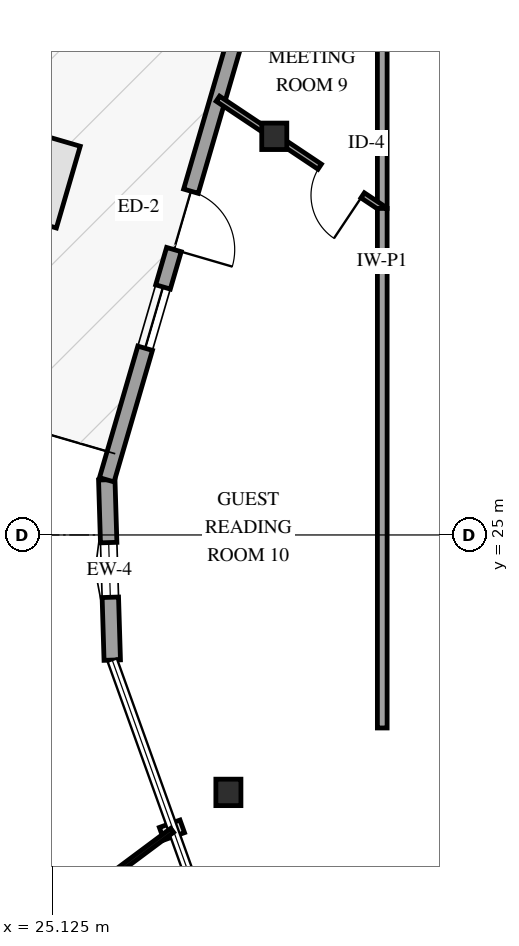
"""IFC4 building model, lengths in metres.
Left out: names, types, materials, properties, quantities, classifications, styles, units other than length and angle.
Written with IfcOpenShell. Run it as: python <this file> out.ifc"""

import sys

from ifc_helpers import new_model, si_unit, direction, frame, frame_2d, origin, origin_2d, place, context, subcontext, project, spatial, rectangle, i_section, extrude, element, fill, save


model = new_model("IFC4")
c1 = context("Model", 3, precision=1e-05, world=origin(), true_north=direction((0.0, 1.0)))
c2 = subcontext(c1, "Body", "Model", "MODEL_VIEW")
j1 = project(units=[si_unit("LENGTHUNIT", "METRE"), si_unit("PLANEANGLEUNIT", "RADIAN")], contexts=[c1])
p1 = place(None, origin())
s1 = spatial("IfcSite", under=j1, at=p1, CompositionType="ELEMENT")
p2 = place(p1, origin())
s2 = spatial("IfcBuilding", under=s1, at=p2, CompositionType="ELEMENT")
p3 = place(p2, frame((0.0, 0.0, 171.4)))
s3 = spatial("IfcBuildingStorey", under=s2, at=p3, CompositionType="ELEMENT", Elevation=171.4)
for number, where, z_axis, x_axis in (
    (1, (28.774, 31.556, 0.0), (0.0, 0.0, 1.0), (1.0, 0.0, 0.0)),
    (2, (28.02, 20.766, 0.0), (0.0, 0.0, 1.0), (1.0, 0.0, 0.0)),
):
    element("IfcColumn", number, at=place(p3, frame(where, z_axis=z_axis, x_axis=x_axis)), inside=s3, PredefinedType="COLUMN", context=c2, shape_type="SweptSolid", body=[
        extrude(i_section(OverallWidth=0.412, OverallDepth=0.435, WebThickness=0.036, FlangeThickness=0.057, FilletRadius=0.038, at=origin_2d()), origin(), (0.0, 0.0, 1.0), 3.6),
    ])
p4 = place(p3, frame((26.02, 25.907, 0.0), z_axis=(0.0, 0.0, 1.0), x_axis=(0.030366361796, -0.999538835699, 0.0)))
e3 = element("IfcWall", 3, at=p4, inside=s3, PredefinedType="SOLIDWALL", context=c2, shape_type="SweptSolid", body=[
    extrude(rectangle(XDim=2.967, YDim=0.27, at=frame_2d((1.483, 0.0))), origin(), (0.0, 0.0, 1.0), 2.679),
])
p5 = place(p4, frame((1.033, 0.0, 0.75)))
e4 = element("IfcOpeningElement", 4, at=p5, cuts=e3, PredefinedType="OPENING", context=c2, shape_type="SweptSolid", body=[
    extrude(rectangle(XDim=0.9, YDim=1.5, at=frame_2d((0.45, 0.75))), frame((0.0, 0.145, 0.0), z_axis=(0.0, -1.0, 0.0), x_axis=(1.0, 0.0, 0.0)), (0.0, 0.0, 1.0), 0.29),
])
p6 = place(p3, frame((28.508, 34.439, 0.0), z_axis=(0.0, 0.0, 1.0), x_axis=(-0.28, -0.96, 0.0)))
e5 = element("IfcWall", 5, at=p6, inside=s3, PredefinedType="SOLIDWALL", context=c2, shape_type="SweptSolid", body=[
    extrude(rectangle(XDim=8.887, YDim=0.25, at=frame_2d((4.443, 0.0))), origin(), (0.0, 0.0, 1.0), 2.679),
])
p7 = place(p6, frame((3.943, 0.0, 0.0)))
e6 = element("IfcOpeningElement", 6, at=p7, cuts=e5, PredefinedType="OPENING", context=c2, shape_type="SweptSolid", body=[
    extrude(rectangle(XDim=1.0, YDim=2.15, at=frame_2d((0.5, 1.075))), frame((0.0, 0.135, 0.0), z_axis=(0.0, -1.0, 0.0), x_axis=(1.0, 0.0, 0.0)), (0.0, 0.0, 1.0), 0.27),
])
p8 = place(p6, frame((0.44, 0.0, 0.72)))
e7 = element("IfcOpeningElement", 7, at=p8, cuts=e5, PredefinedType="OPENING", context=c2, shape_type="SweptSolid", body=[
    extrude(rectangle(XDim=1.05, YDim=1.55, at=frame_2d((0.525, 0.775))), frame((0.0, 0.135, 0.0), z_axis=(0.0, -1.0, 0.0), x_axis=(1.0, 0.0, 0.0)), (0.0, 0.0, 1.0), 0.27),
])
p9 = place(p6, frame((5.583, 0.0, 0.72)))
e8 = element("IfcOpeningElement", 8, at=p9, cuts=e5, PredefinedType="OPENING", context=c2, shape_type="SweptSolid", body=[
    extrude(rectangle(XDim=1.05, YDim=1.55, at=frame_2d((0.525, 0.775))), frame((0.0, 0.135, 0.0), z_axis=(0.0, -1.0, 0.0), x_axis=(1.0, 0.0, 0.0)), (0.0, 0.0, 1.0), 0.27),
])
p10 = place(p3, frame((30.55, 30.37, 0.0), z_axis=(0.0, 0.0, 1.0), x_axis=(0.0, 1.0, 0.0)))
e9 = element("IfcWall", 9, at=p10, inside=s3, PredefinedType="PARTITIONING", context=c2, shape_type="SweptSolid", body=[
    extrude(rectangle(XDim=6.809, YDim=0.16, at=frame_2d((3.404, 0.0))), origin(), (0.0, 0.0, 1.0), 3.3),
])
p11 = place(p10, frame((2.93, 0.0, 0.0)))
e10 = element("IfcOpeningElement", 10, at=p11, cuts=e9, PredefinedType="OPENING", context=c2, shape_type="SweptSolid", body=[
    extrude(rectangle(XDim=0.95, YDim=2.15, at=frame_2d((0.475, 1.075))), frame((0.0, 0.09, 0.0), z_axis=(0.0, -1.0, 0.0), x_axis=(1.0, 0.0, 0.0)), (0.0, 0.0, 1.0), 0.18),
])
p12 = place(p3, frame((30.55, 30.37, 0.0), z_axis=(0.0, 0.0, 1.0), x_axis=(-0.831784371752, 0.555098873092, 0.0)))
e11 = element("IfcWall", 11, at=p12, inside=s3, PredefinedType="PARTITIONING", context=c2, shape_type="SweptSolid", body=[
    extrude(rectangle(XDim=3.25, YDim=0.1, at=frame_2d((1.625, 0.0))), origin(), (0.0, 0.0, 1.0), 3.3),
])
p13 = place(p12, frame((0.387, 0.0, 0.0)))
e12 = element("IfcOpeningElement", 12, at=p13, cuts=e11, PredefinedType="OPENING", context=c2, shape_type="SweptSolid", body=[
    extrude(rectangle(XDim=0.85, YDim=2.1, at=frame_2d((0.425, 1.05))), frame((0.0, 0.06, 0.0), z_axis=(0.0, -1.0, 0.0), x_axis=(1.0, 0.0, 0.0)), (0.0, 0.0, 1.0), 0.12),
])
p14 = place(p3, frame((30.55, 21.826, 0.0), z_axis=(0.0, 0.0, 1.0), x_axis=(0.0, 1.0, 0.0)))
e13 = element("IfcWall", 13, at=p14, inside=s3, PredefinedType="PARTITIONING", context=c2, shape_type="SweptSolid", body=[
    extrude(rectangle(XDim=8.544, YDim=0.16, at=frame_2d((4.272, 0.0))), origin(), (0.0, 0.0, 1.0), 3.3),
])
p15 = place(p5, origin())
e14 = element("IfcWindow", 14, at=p15, inside=s3, PartitioningType="SINGLE_PANEL", PredefinedType="WINDOW", context=c2, shape_type="SweptSolid", body=[
    extrude(rectangle(XDim=0.9, YDim=1.5, at=frame_2d((0.45, 0.75))), frame((0.0, 0.03, 0.0), z_axis=(0.0, -1.0, 0.0), x_axis=(1.0, 0.0, 0.0)), (0.0, 0.0, 1.0), 0.06),
])
fill(e4, e14)
p16 = place(p7, origin())
e15 = element("IfcDoor", 15, at=p16, inside=s3, OperationType="SINGLE_SWING_RIGHT", PredefinedType="DOOR", context=c2, shape_type="SweptSolid", body=[
    extrude(rectangle(XDim=1.0, YDim=2.15, at=frame_2d((0.5, 1.075))), frame((0.0, 0.025, 0.0), z_axis=(0.0, -1.0, 0.0), x_axis=(1.0, 0.0, 0.0)), (0.0, 0.0, 1.0), 0.05),
])
fill(e6, e15)
p17 = place(p9, origin())
e16 = element("IfcWindow", 16, at=p17, inside=s3, PartitioningType="SINGLE_PANEL", PredefinedType="WINDOW", context=c2, shape_type="SweptSolid", body=[
    extrude(rectangle(XDim=1.05, YDim=1.55, at=frame_2d((0.525, 0.775))), frame((0.0, 0.03, 0.0), z_axis=(0.0, -1.0, 0.0), x_axis=(1.0, 0.0, 0.0)), (0.0, 0.0, 1.0), 0.06),
])
fill(e8, e16)
p18 = place(p13, origin())
e17 = element("IfcDoor", 17, at=p18, inside=s3, OperationType="SINGLE_SWING_LEFT", PredefinedType="DOOR", context=c2, shape_type="SweptSolid", body=[
    extrude(rectangle(XDim=0.85, YDim=2.1, at=frame_2d((0.425, 1.05))), frame((0.0, 0.025, 0.0), z_axis=(0.0, -1.0, 0.0), x_axis=(1.0, 0.0, 0.0)), (0.0, 0.0, 1.0), 0.05),
])
fill(e12, e17)
save(model, sys.argv[1])
